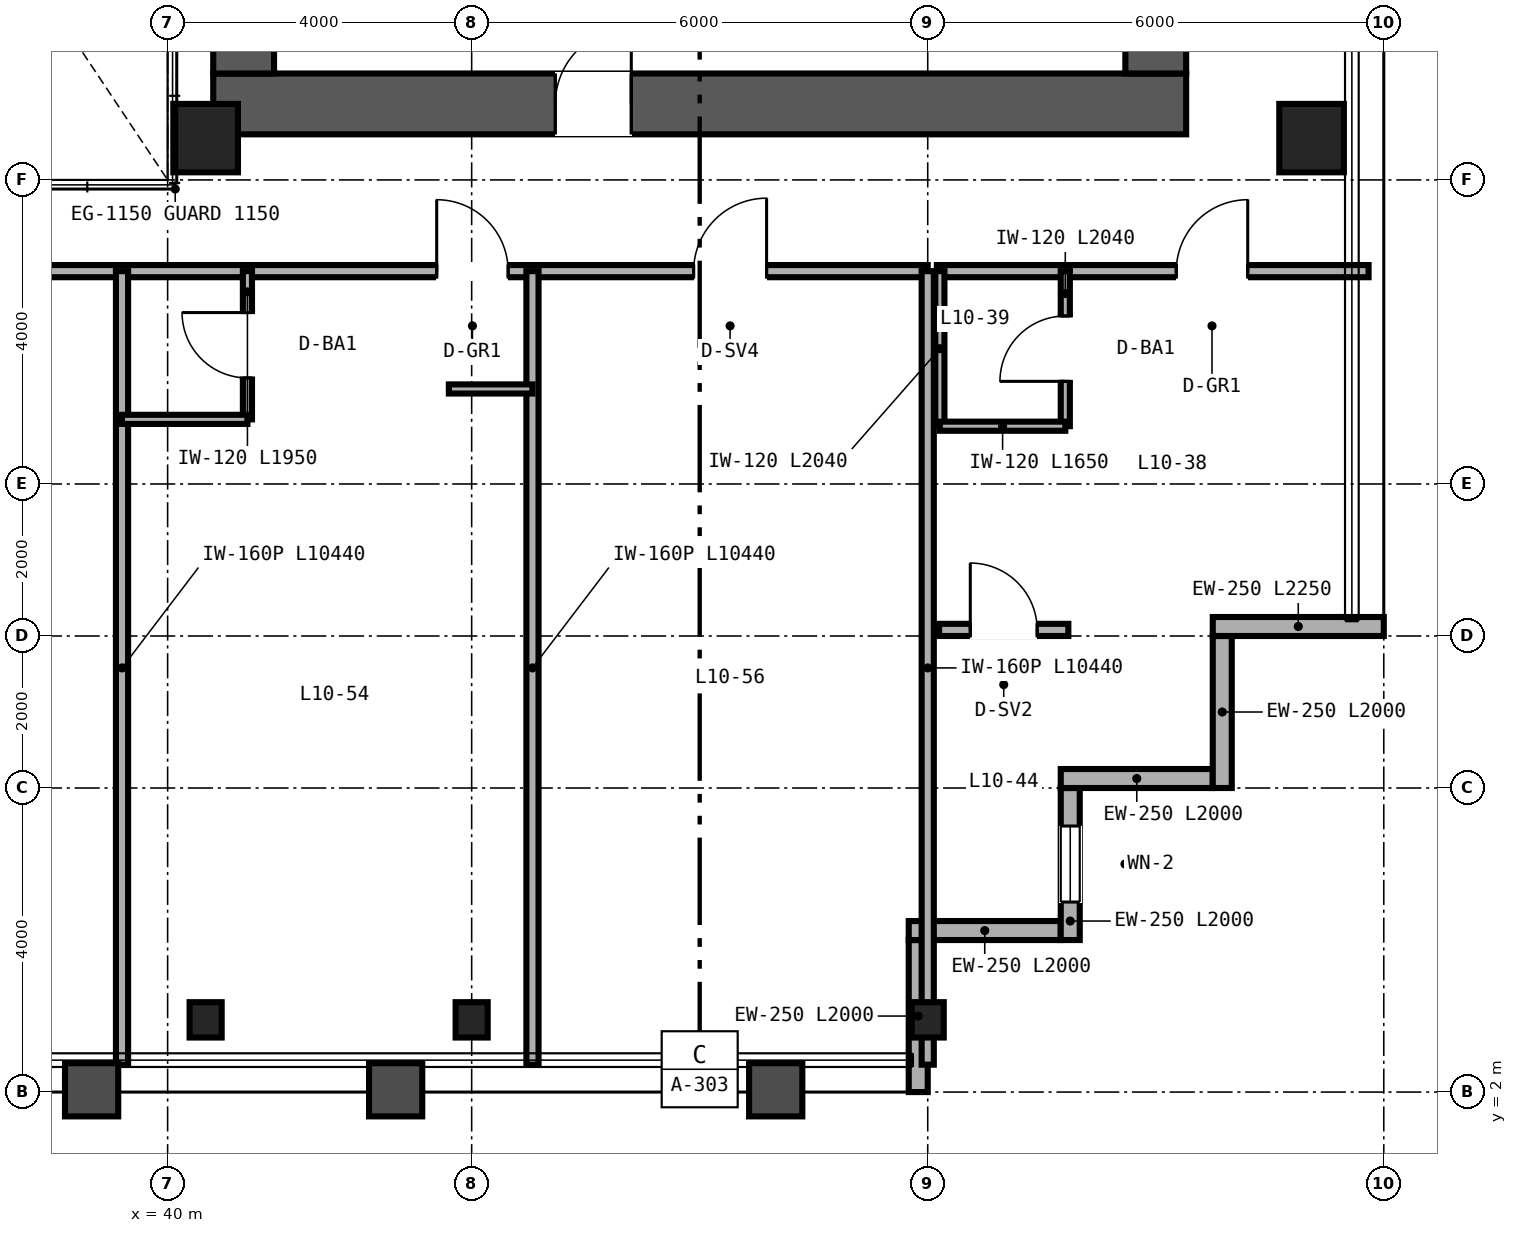
"""IFC4 building model, lengths in metres.
Left out: names, types, materials, properties, quantities, classifications, styles, units other than length and angle.
Written with IfcOpenShell. Run it as: python <this file> out.ifc"""

import sys

from ifc_helpers import new_model, si_unit, direction, frame, frame_2d, origin, origin_2d, place, context, subcontext, project, spatial, rectangle, hollow_rectangle, i_section, extrude, source, transform, mapped, element, fill, save


model = new_model("IFC4")
c1 = context("Model", 3, precision=1e-05, world=origin(), true_north=direction((0.0, 1.0)))
c2 = subcontext(c1, "Body", "Model", "MODEL_VIEW")
j1 = project(units=[si_unit("LENGTHUNIT", "METRE"), si_unit("PLANEANGLEUNIT", "RADIAN")], contexts=[c1])
p1 = place(None, origin())
s1 = spatial("IfcSite", under=j1, at=p1, CompositionType="ELEMENT")
p2 = place(p1, origin())
s2 = spatial("IfcBuilding", under=s1, at=p2, CompositionType="ELEMENT")
p3 = place(p2, frame((0.0, 0.0, 45.6)))
s3 = spatial("IfcBuildingStorey", under=s2, at=p3, CompositionType="ELEMENT", Elevation=45.6)
p4 = place(p3, frame((40.6, 15.0, 0.0), z_axis=(0.0, 0.0, 1.0), x_axis=(1.0, 0.0, 0.0)))
e1 = element("IfcWall", 1, at=p4, inside=s3, PredefinedType="SHEAR", context=c2, shape_type="SweptSolid", body=[
    extrude(rectangle(XDim=12.8, YDim=0.8, at=frame_2d((6.4, 0.0))), origin(), (0.0, 0.0, 1.0), 3.35),
])
p5 = place(p4, frame((4.5, 0.0, 0.0)))
e2 = element("IfcOpeningElement", 2, at=p5, cuts=e1, PredefinedType="OPENING", context=c2, shape_type="SweptSolid", body=[
    extrude(rectangle(XDim=1.0, YDim=2.15, at=frame_2d((0.5, 1.075))), frame((0.0, 0.41, 0.0), z_axis=(0.0, -1.0, 0.0), x_axis=(1.0, 0.0, 0.0)), (0.0, 0.0, 1.0), 0.82),
])
for number, where, z_axis, x_axis in (
    (3, (41.0, 15.4, 0.0), (0.0, 0.0, 1.0), (0.0, 1.0, 0.0)),
    (4, (53.0, 15.4, 0.0), (0.0, 0.0, 1.0), (0.0, 1.0, 0.0)),
):
    element("IfcWall", number, at=place(p3, frame(where, z_axis=z_axis, x_axis=x_axis)), inside=s3, PredefinedType="SHEAR", context=c2, shape_type="SweptSolid", body=[
        extrude(rectangle(XDim=21.2, YDim=0.8, at=frame_2d((10.6, 0.0))), origin(), (0.0, 0.0, 1.0), 3.35),
    ])
m1 = source(origin(), c2, "Body", "SweptSolid", [
    extrude(hollow_rectangle(XDim=0.85, YDim=0.9, WallThickness=0.04, at=origin_2d()), origin(), (0.0, 0.0, 1.0), 3.35),
])
for number, where, z_axis, x_axis in (
    (5, (40.5, 14.55, 0.0), (0.0, 0.0, 1.0), (1.0, 0.0, 0.0)),
    (6, (55.05, 14.55, 0.0), (0.0, 0.0, 1.0), (1.0, 0.0, 0.0)),
):
    element("IfcColumn", number, at=place(p3, frame(where, z_axis=z_axis, x_axis=x_axis)), inside=s3, PredefinedType="COLUMN", context=c2, shape_type="MappedRepresentation", body=[
        mapped(m1, transform((0.0, 0.0, 0.0), scale=1.0)),
    ])
m2 = source(origin(), c2, "Body", "SweptSolid", [
    extrude(i_section(OverallWidth=0.422, OverallDepth=0.465, WebThickness=0.045, FlangeThickness=0.073, FilletRadius=0.025, at=origin_2d()), origin(), (0.0, 0.0, 1.0), 3.35),
])
for number, where, z_axis, x_axis in (
    (7, (40.5, 2.95, 0.0), (0.0, 0.0, 1.0), (1.0, 0.0, 0.0)),
    (8, (44.0, 2.95, 0.0), (0.0, 0.0, 1.0), (1.0, 0.0, 0.0)),
    (9, (50.0, 2.95, 0.0), (0.0, 0.0, 1.0), (1.0, 0.0, 0.0)),
):
    element("IfcColumn", number, at=place(p3, frame(where, z_axis=z_axis, x_axis=x_axis)), inside=s3, PredefinedType="COLUMN", context=c2, shape_type="MappedRepresentation", body=[
        mapped(m2, transform((0.0, 0.0, 0.0), scale=1.0)),
    ])
p6 = place(p3, frame((49.875, 2.0, 0.0), z_axis=(0.0, 0.0, 1.0), x_axis=(0.0, 1.0, 0.0)))
e10 = element("IfcWall", 10, at=p6, inside=s3, PredefinedType="SOLIDWALL", context=c2, shape_type="SweptSolid", body=[
    extrude(rectangle(XDim=2.0, YDim=0.25, at=frame_2d((1.0, 0.0))), origin(), (0.0, 0.0, 1.0), 2.657),
])
p7 = place(p3, frame((49.75, 4.125, 0.0), z_axis=(0.0, 0.0, 1.0), x_axis=(1.0, 0.0, 0.0)))
e11 = element("IfcWall", 11, at=p7, inside=s3, PredefinedType="SOLIDWALL", context=c2, shape_type="SweptSolid", body=[
    extrude(rectangle(XDim=2.0, YDim=0.25, at=frame_2d((1.0, 0.0))), origin(), (0.0, 0.0, 1.0), 3.35),
])
p8 = place(p3, frame((51.875, 4.0, 0.0), z_axis=(0.0, 0.0, 1.0), x_axis=(0.0, 1.0, 0.0)))
e12 = element("IfcWall", 12, at=p8, inside=s3, PredefinedType="SOLIDWALL", context=c2, shape_type="SweptSolid", body=[
    extrude(rectangle(XDim=2.0, YDim=0.25, at=frame_2d((1.0, 0.0))), origin(), (0.0, 0.0, 1.0), 3.35),
])
p9 = place(p8, frame((0.5, 0.0, 0.85)))
e13 = element("IfcOpeningElement", 13, at=p9, cuts=e12, PredefinedType="OPENING", context=c2, shape_type="SweptSolid", body=[
    extrude(rectangle(XDim=1.0, YDim=1.9, at=frame_2d((0.5, 0.95))), frame((0.0, 0.135, 0.0), z_axis=(0.0, -1.0, 0.0), x_axis=(1.0, 0.0, 0.0)), (0.0, 0.0, 1.0), 0.27),
])
for number, where, z_axis, x_axis in (
    (14, (51.75, 6.125, 0.0), (0.0, 0.0, 1.0), (1.0, 0.0, 0.0)),
    (15, (53.875, 6.0, 0.0), (0.0, 0.0, 1.0), (0.0, 1.0, 0.0)),
):
    element("IfcWall", number, at=place(p3, frame(where, z_axis=z_axis, x_axis=x_axis)), inside=s3, PredefinedType="SOLIDWALL", context=c2, shape_type="SweptSolid", body=[
        extrude(rectangle(XDim=2.0, YDim=0.25, at=frame_2d((1.0, 0.0))), origin(), (0.0, 0.0, 1.0), 3.35),
    ])
p10 = place(p3, frame((53.75, 8.125, 0.0), z_axis=(0.0, 0.0, 1.0), x_axis=(1.0, 0.0, 0.0)))
e16 = element("IfcWall", 16, at=p10, inside=s3, PredefinedType="SOLIDWALL", context=c2, shape_type="SweptSolid", body=[
    extrude(rectangle(XDim=2.25, YDim=0.25, at=frame_2d((1.125, 0.0))), origin(), (0.0, 0.0, 1.0), 3.35),
])
p11 = place(p3, frame((50.12, 12.8, 0.0), z_axis=(0.0, 0.0, 1.0), x_axis=(1.0, 0.0, 0.0)))
e17 = element("IfcWall", 17, at=p11, inside=s3, PredefinedType="PARTITIONING", context=c2, shape_type="SweptSolid", body=[
    extrude(rectangle(XDim=5.68, YDim=0.16, at=frame_2d((2.84, 0.0))), origin(), (0.0, 0.0, 1.0), 3.35),
])
p12 = place(p11, frame((3.15, 0.0, 0.0)))
e18 = element("IfcOpeningElement", 18, at=p12, cuts=e17, PredefinedType="OPENING", context=c2, shape_type="SweptSolid", body=[
    extrude(rectangle(XDim=0.94, YDim=2.15, at=frame_2d((0.47, 1.075))), frame((0.0, 0.09, 0.0), z_axis=(0.0, -1.0, 0.0), x_axis=(1.0, 0.0, 0.0)), (0.0, 0.0, 1.0), 0.18),
])
p13 = place(p3, frame((51.81, 10.76, 0.0), z_axis=(0.0, 0.0, 1.0), x_axis=(0.0, 1.0, 0.0)))
e19 = element("IfcWall", 19, at=p13, inside=s3, PredefinedType="PARTITIONING", context=c2, shape_type="SweptSolid", body=[
    extrude(rectangle(XDim=2.04, YDim=0.12, at=frame_2d((1.02, 0.0))), origin(), (0.0, 0.0, 1.0), 3.35),
])
p14 = place(p13, frame((0.59, 0.0, 0.0)))
e20 = element("IfcOpeningElement", 20, at=p14, cuts=e19, PredefinedType="OPENING", context=c2, shape_type="SweptSolid", body=[
    extrude(rectangle(XDim=0.86, YDim=2.1, at=frame_2d((0.43, 1.05))), frame((0.0, 0.07, 0.0), z_axis=(0.0, -1.0, 0.0), x_axis=(1.0, 0.0, 0.0)), (0.0, 0.0, 1.0), 0.14),
])
p15 = place(p3, frame((50.16, 10.76, 0.0), z_axis=(0.0, 0.0, 1.0), x_axis=(0.0, 1.0, 0.0)))
e21 = element("IfcWall", 21, at=p15, inside=s3, PredefinedType="PARTITIONING", context=c2, shape_type="SweptSolid", body=[
    extrude(rectangle(XDim=2.04, YDim=0.12, at=frame_2d((1.02, 0.0))), origin(), (0.0, 0.0, 1.0), 3.35),
])
p16 = place(p3, frame((50.16, 10.76, 0.0), z_axis=(0.0, 0.0, 1.0), x_axis=(1.0, 0.0, 0.0)))
e22 = element("IfcWall", 22, at=p16, inside=s3, PredefinedType="PARTITIONING", context=c2, shape_type="SweptSolid", body=[
    extrude(rectangle(XDim=1.65, YDim=0.12, at=frame_2d((0.825, 0.0))), origin(), (0.0, 0.0, 1.0), 3.35),
])
p17 = place(p3, frame((50.15, 8.08, 0.0), z_axis=(0.0, 0.0, 1.0), x_axis=(1.0, 0.0, 0.0)))
e23 = element("IfcWall", 23, at=p17, inside=s3, PredefinedType="PARTITIONING", context=c2, shape_type="SweptSolid", body=[
    extrude(rectangle(XDim=1.7, YDim=0.16, at=frame_2d((0.85, 0.0))), origin(), (0.0, 0.0, 1.0), 3.35),
])
p18 = place(p17, frame((0.41, 0.0, 0.0)))
e24 = element("IfcOpeningElement", 24, at=p18, cuts=e23, PredefinedType="OPENING", context=c2, shape_type="SweptSolid", body=[
    extrude(rectangle(XDim=0.88, YDim=2.15, at=frame_2d((0.44, 1.075))), frame((0.0, 0.09, 0.0), z_axis=(0.0, -1.0, 0.0), x_axis=(1.0, 0.0, 0.0)), (0.0, 0.0, 1.0), 0.18),
])
p19 = place(p3, frame((14.0, 12.8, 0.0), z_axis=(0.0, 0.0, 1.0), x_axis=(1.0, 0.0, 0.0)))
e25 = element("IfcWall", 25, at=p19, inside=s3, PredefinedType="PARTITIONING", context=c2, shape_type="SweptSolid", body=[
    extrude(rectangle(XDim=36.0, YDim=0.16, at=frame_2d((18.0, 0.0))), origin(), (0.0, 0.0, 1.0), 2.571),
])
p20 = place(p19, frame((5.14, 0.0, 0.0)))
e26 = element("IfcOpeningElement", 26, at=p20, cuts=e25, PredefinedType="OPENING", context=c2, shape_type="SweptSolid", body=[
    extrude(rectangle(XDim=0.94, YDim=2.15, at=frame_2d((0.47, 1.075))), frame((0.0, 0.09, 0.0), z_axis=(0.0, -1.0, 0.0), x_axis=(1.0, 0.0, 0.0)), (0.0, 0.0, 1.0), 0.18),
])
p21 = place(p19, frame((11.34, 0.0, 0.0)))
e27 = element("IfcOpeningElement", 27, at=p21, cuts=e25, PredefinedType="OPENING", context=c2, shape_type="SweptSolid", body=[
    extrude(rectangle(XDim=0.94, YDim=2.15, at=frame_2d((0.47, 1.075))), frame((0.0, 0.09, 0.0), z_axis=(0.0, -1.0, 0.0), x_axis=(1.0, 0.0, 0.0)), (0.0, 0.0, 1.0), 0.18),
])
p22 = place(p19, frame((17.94, 0.0, 0.0)))
e28 = element("IfcOpeningElement", 28, at=p22, cuts=e25, PredefinedType="OPENING", context=c2, shape_type="SweptSolid", body=[
    extrude(rectangle(XDim=0.94, YDim=2.15, at=frame_2d((0.47, 1.075))), frame((0.0, 0.09, 0.0), z_axis=(0.0, -1.0, 0.0), x_axis=(1.0, 0.0, 0.0)), (0.0, 0.0, 1.0), 0.18),
])
p23 = place(p19, frame((21.82, 0.0, 0.0)))
e29 = element("IfcOpeningElement", 29, at=p23, cuts=e25, PredefinedType="OPENING", context=c2, shape_type="SweptSolid", body=[
    extrude(rectangle(XDim=0.96, YDim=2.15, at=frame_2d((0.48, 1.075))), frame((0.0, 0.09, 0.0), z_axis=(0.0, -1.0, 0.0), x_axis=(1.0, 0.0, 0.0)), (0.0, 0.0, 1.0), 0.18),
])
p24 = place(p19, frame((29.54, 0.0, 0.0)))
e30 = element("IfcOpeningElement", 30, at=p24, cuts=e25, PredefinedType="OPENING", context=c2, shape_type="SweptSolid", body=[
    extrude(rectangle(XDim=0.94, YDim=2.15, at=frame_2d((0.47, 1.075))), frame((0.0, 0.09, 0.0), z_axis=(0.0, -1.0, 0.0), x_axis=(1.0, 0.0, 0.0)), (0.0, 0.0, 1.0), 0.18),
])
p25 = place(p19, frame((32.92, 0.0, 0.0)))
e31 = element("IfcOpeningElement", 31, at=p25, cuts=e25, PredefinedType="OPENING", context=c2, shape_type="SweptSolid", body=[
    extrude(rectangle(XDim=0.96, YDim=2.15, at=frame_2d((0.48, 1.075))), frame((0.0, 0.09, 0.0), z_axis=(0.0, -1.0, 0.0), x_axis=(1.0, 0.0, 0.0)), (0.0, 0.0, 1.0), 0.18),
])
p26 = place(p3, frame((50.0, 2.36, 0.0), z_axis=(0.0, 0.0, 1.0), x_axis=(0.0, 1.0, 0.0)))
e32 = element("IfcWall", 32, at=p26, inside=s3, PredefinedType="PARTITIONING", context=c2, shape_type="SweptSolid", body=[
    extrude(rectangle(XDim=10.44, YDim=0.16, at=frame_2d((5.22, 0.0))), origin(), (0.0, 0.0, 1.0), 2.657),
])
p27 = place(p3, frame((39.4, 2.36, 0.0), z_axis=(0.0, 0.0, 1.0), x_axis=(0.0, 1.0, 0.0)))
e33 = element("IfcWall", 33, at=p27, inside=s3, PredefinedType="PARTITIONING", context=c2, shape_type="SweptSolid", body=[
    extrude(rectangle(XDim=10.44, YDim=0.16, at=frame_2d((5.22, 0.0))), origin(), (0.0, 0.0, 1.0), 2.423),
])
p28 = place(p3, frame((44.8, 2.36, 0.0), z_axis=(0.0, 0.0, 1.0), x_axis=(0.0, 1.0, 0.0)))
e34 = element("IfcWall", 34, at=p28, inside=s3, PredefinedType="PARTITIONING", context=c2, shape_type="SweptSolid", body=[
    extrude(rectangle(XDim=10.44, YDim=0.16, at=frame_2d((5.22, 0.0))), origin(), (0.0, 0.0, 1.0), 2.657),
])
p29 = place(p3, frame((41.05, 10.85, 0.0), z_axis=(0.0, 0.0, 1.0), x_axis=(0.0, 1.0, 0.0)))
e35 = element("IfcWall", 35, at=p29, inside=s3, PredefinedType="PARTITIONING", context=c2, shape_type="SweptSolid", body=[
    extrude(rectangle(XDim=1.95, YDim=0.12, at=frame_2d((0.975, 0.0))), origin(), (0.0, 0.0, 1.0), 3.35),
])
p30 = place(p29, frame((0.545, 0.0, 0.0)))
e36 = element("IfcOpeningElement", 36, at=p30, cuts=e35, PredefinedType="OPENING", context=c2, shape_type="SweptSolid", body=[
    extrude(rectangle(XDim=0.86, YDim=2.1, at=frame_2d((0.43, 1.05))), frame((0.0, 0.07, 0.0), z_axis=(0.0, -1.0, 0.0), x_axis=(1.0, 0.0, 0.0)), (0.0, 0.0, 1.0), 0.14),
])
p31 = place(p3, frame((39.4, 10.85, 0.0), z_axis=(0.0, 0.0, 1.0), x_axis=(1.0, 0.0, 0.0)))
e37 = element("IfcWall", 37, at=p31, inside=s3, PredefinedType="PARTITIONING", context=c2, shape_type="SweptSolid", body=[
    extrude(rectangle(XDim=1.65, YDim=0.12, at=frame_2d((0.825, 0.0))), origin(), (0.0, 0.0, 1.0), 2.571),
])
p32 = place(p3, frame((43.7, 11.25, 0.0), z_axis=(0.0, 0.0, 1.0), x_axis=(1.0, 0.0, 0.0)))
e38 = element("IfcWall", 38, at=p32, inside=s3, PredefinedType="PARTITIONING", context=c2, shape_type="SweptSolid", body=[
    extrude(rectangle(XDim=1.1, YDim=0.12, at=frame_2d((0.55, 0.0))), origin(), (0.0, 0.0, 1.0), 3.35),
])
m3 = source(origin(), c2, "Body", "SweptSolid", [
    extrude(rectangle(XDim=1.0, YDim=1.9, at=frame_2d((0.5, 0.95))), frame((0.0, 0.03, 0.0), z_axis=(0.0, -1.0, 0.0), x_axis=(1.0, 0.0, 0.0)), (0.0, 0.0, 1.0), 0.06),
])
p33 = place(p9, origin())
e39 = element("IfcWindow", 39, at=p33, inside=s3, PartitioningType="SINGLE_PANEL", PredefinedType="WINDOW", context=c2, shape_type="MappedRepresentation", body=[
    mapped(m3, transform((0.0, 0.0, 0.0), scale=1.0)),
])
fill(e13, e39)
m4 = source(origin(), c2, "Body", "SweptSolid", [
    extrude(rectangle(XDim=1.0, YDim=2.15, at=frame_2d((0.5, 1.075))), frame((0.0, 0.025, 0.0), z_axis=(0.0, -1.0, 0.0), x_axis=(1.0, 0.0, 0.0)), (0.0, 0.0, 1.0), 0.05),
])
p34 = place(p5, origin())
e40 = element("IfcDoor", 40, at=p34, inside=s3, OperationType="SINGLE_SWING_RIGHT", PredefinedType="DOOR", context=c2, shape_type="MappedRepresentation", body=[
    mapped(m4, transform((0.0, 0.0, 0.0), scale=1.0)),
])
fill(e2, e40)
m5 = source(origin(), c2, "Body", "SweptSolid", [
    extrude(rectangle(XDim=0.86, YDim=2.1, at=frame_2d((0.43, 1.05))), frame((0.0, 0.025, 0.0), z_axis=(0.0, -1.0, 0.0), x_axis=(1.0, 0.0, 0.0)), (0.0, 0.0, 1.0), 0.05),
])
p35 = place(p14, origin())
e41 = element("IfcDoor", 41, at=p35, inside=s3, OperationType="SINGLE_SWING_LEFT", PredefinedType="DOOR", context=c2, shape_type="MappedRepresentation", body=[
    mapped(m5, transform((0.0, 0.0, 0.0), scale=1.0)),
])
fill(e20, e41)
m6 = source(origin(), c2, "Body", "SweptSolid", [
    extrude(rectangle(XDim=0.94, YDim=2.15, at=frame_2d((0.47, 1.075))), frame((0.0, 0.025, 0.0), z_axis=(0.0, -1.0, 0.0), x_axis=(1.0, 0.0, 0.0)), (0.0, 0.0, 1.0), 0.05),
])
p36 = place(p12, origin())
e42 = element("IfcDoor", 42, at=p36, inside=s3, OperationType="SINGLE_SWING_RIGHT", PredefinedType="DOOR", context=c2, shape_type="MappedRepresentation", body=[
    mapped(m6, transform((0.0, 0.0, 0.0), scale=1.0)),
])
fill(e18, e42)
m7 = source(origin(), c2, "Body", "SweptSolid", [
    extrude(rectangle(XDim=0.88, YDim=2.15, at=frame_2d((0.44, 1.075))), frame((0.0, 0.025, 0.0), z_axis=(0.0, -1.0, 0.0), x_axis=(1.0, 0.0, 0.0)), (0.0, 0.0, 1.0), 0.05),
])
p37 = place(p18, origin())
e43 = element("IfcDoor", 43, at=p37, inside=s3, OperationType="SINGLE_SWING_LEFT", PredefinedType="DOOR", context=c2, shape_type="MappedRepresentation", body=[
    mapped(m7, transform((0.0, 0.0, 0.0), scale=1.0)),
])
fill(e24, e43)
p38 = place(p30, origin())
e44 = element("IfcDoor", 44, at=p38, inside=s3, OperationType="SINGLE_SWING_RIGHT", PredefinedType="DOOR", context=c2, shape_type="MappedRepresentation", body=[
    mapped(m5, transform((0.0, 0.0, 0.0), scale=1.0)),
])
fill(e36, e44)
p39 = place(p24, origin())
e45 = element("IfcDoor", 45, at=p39, inside=s3, OperationType="SINGLE_SWING_LEFT", PredefinedType="DOOR", context=c2, shape_type="MappedRepresentation", body=[
    mapped(m6, transform((0.0, 0.0, 0.0), scale=1.0)),
])
fill(e30, e45)
m8 = source(origin(), c2, "Body", "SweptSolid", [
    extrude(rectangle(XDim=0.96, YDim=2.15, at=frame_2d((0.48, 1.075))), frame((0.0, 0.025, 0.0), z_axis=(0.0, -1.0, 0.0), x_axis=(1.0, 0.0, 0.0)), (0.0, 0.0, 1.0), 0.05),
])
p40 = place(p25, origin())
e46 = element("IfcDoor", 46, at=p40, inside=s3, OperationType="SINGLE_SWING_RIGHT", PredefinedType="DOOR", context=c2, shape_type="MappedRepresentation", body=[
    mapped(m8, transform((0.0, 0.0, 0.0), scale=1.0)),
])
fill(e31, e46)
save(model, sys.argv[1])
